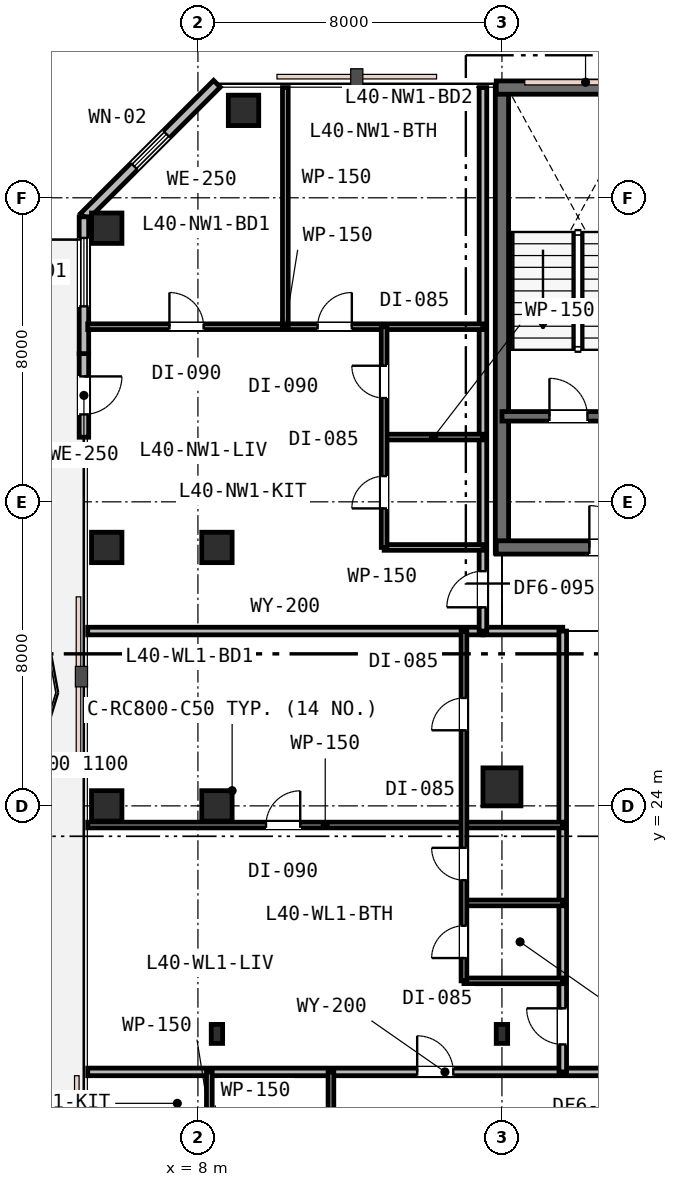
"""IFC4 building model, lengths in metres.
Left out: names, types, materials, properties, quantities, classifications, styles, units other than length and angle.
Written with IfcOpenShell. Run it as: python <this file> out.ifc"""

import sys

from ifc_helpers import new_model, si_unit, direction, frame, frame_2d, origin, origin_2d, place, context, subcontext, project, spatial, rectangle, i_section, extrude, element, fill, save


model = new_model("IFC4")
c1 = context("Model", 3, precision=1e-05, world=origin(), true_north=direction((0.0, 1.0)))
c2 = subcontext(c1, "Body", "Model", "MODEL_VIEW")
j1 = project(units=[si_unit("LENGTHUNIT", "METRE"), si_unit("PLANEANGLEUNIT", "RADIAN")], contexts=[c1])
p1 = place(None, origin())
s1 = spatial("IfcSite", under=j1, at=p1, CompositionType="ELEMENT")
p2 = place(p1, origin())
s2 = spatial("IfcBuilding", under=s1, at=p2, CompositionType="ELEMENT")
p3 = place(p2, frame((0.0, 0.0, 157.8)))
s3 = spatial("IfcBuildingStorey", under=s2, at=p3, CompositionType="ELEMENT", Elevation=157.8)
p4 = place(p3, frame((16.0, 30.65, 0.0), z_axis=(0.0, 0.0, 1.0), x_axis=(0.0, 1.0, 0.0)))
e1 = element("IfcWall", 1, at=p4, inside=s3, PredefinedType="SHEAR", context=c2, shape_type="SweptSolid", body=[
    extrude(rectangle(XDim=12.3, YDim=0.35, at=frame_2d((6.15, 0.0))), origin(), (0.0, 0.0, 1.0), 3.6),
])
p5 = place(p3, frame((15.85, 42.9, 0.0), z_axis=(0.0, 0.0, 1.0), x_axis=(1.0, 0.0, 0.0)))
e2 = element("IfcWall", 2, at=p5, inside=s3, PredefinedType="SHEAR", context=c2, shape_type="SweptSolid", body=[
    extrude(rectangle(XDim=24.3, YDim=0.35, at=frame_2d((12.15, 0.0))), origin(), (0.0, 0.0, 1.0), 3.6),
])
p6 = place(p3, frame((15.85, 30.8, 0.0), z_axis=(0.0, 0.0, 1.0), x_axis=(1.0, 0.0, 0.0)))
e3 = element("IfcWall", 3, at=p6, inside=s3, PredefinedType="SHEAR", context=c2, shape_type="SweptSolid", body=[
    extrude(rectangle(XDim=11.2, YDim=0.35, at=frame_2d((5.6, 0.0))), origin(), (0.0, 0.0, 1.0), 3.6),
])
p7 = place(p6, frame((2.45, 0.0, 0.0)))
e4 = element("IfcOpeningElement", 4, at=p7, cuts=e3, PredefinedType="OPENING", context=c2, shape_type="SweptSolid", body=[
    extrude(rectangle(XDim=1.1, YDim=2.15, at=frame_2d((0.55, 1.075))), frame((0.0, 0.185, 0.0), z_axis=(0.0, -1.0, 0.0), x_axis=(1.0, 0.0, 0.0)), (0.0, 0.0, 1.0), 0.37),
])
p8 = place(p3, frame((16.0, 34.25, 0.0), z_axis=(0.0, 0.0, 1.0), x_axis=(1.0, 0.0, 0.0)))
e5 = element("IfcWall", 5, at=p8, inside=s3, PredefinedType="SHEAR", context=c2, shape_type="SweptSolid", body=[
    extrude(rectangle(XDim=6.05, YDim=0.25, at=frame_2d((3.025, 0.0))), origin(), (0.0, 0.0, 1.0), 3.6),
])
p9 = place(p8, frame((1.25, 0.0, 0.0)))
e6 = element("IfcOpeningElement", 6, at=p9, cuts=e5, PredefinedType="OPENING", context=c2, shape_type="SweptSolid", body=[
    extrude(rectangle(XDim=1.0, YDim=2.15, at=frame_2d((0.5, 1.075))), frame((0.0, 0.135, 0.0), z_axis=(0.0, -1.0, 0.0), x_axis=(1.0, 0.0, 0.0)), (0.0, 0.0, 1.0), 0.27),
])
p10 = place(p8, frame((4.2, 0.0, 0.0)))
e7 = element("IfcOpeningElement", 7, at=p10, cuts=e5, PredefinedType="OPENING", context=c2, shape_type="SweptSolid", body=[
    extrude(rectangle(XDim=1.1, YDim=2.15, at=frame_2d((0.55, 1.075))), frame((0.0, 0.135, 0.0), z_axis=(0.0, -1.0, 0.0), x_axis=(1.0, 0.0, 0.0)), (0.0, 0.0, 1.0), 0.27),
])
p11 = place(p3, frame((8.5, 24.0, 0.0), z_axis=(0.0, 0.0, 1.0), x_axis=(1.0, 0.0, 0.0)))
e8 = element("IfcColumn", 8, at=p11, inside=s3, PredefinedType="COLUMN", context=c2, shape_type="SweptSolid", body=[
    extrude(rectangle(XDim=0.8, YDim=0.8, at=origin_2d()), origin(), (0.0, 0.0, 1.0), 3.6),
])
p12 = place(p3, frame((16.0, 24.5, 0.0), z_axis=(0.0, 0.0, 1.0), x_axis=(1.0, 0.0, 0.0)))
e9 = element("IfcColumn", 9, at=p12, inside=s3, PredefinedType="COLUMN", context=c2, shape_type="SweptSolid", body=[
    extrude(rectangle(XDim=1.0, YDim=1.0, at=origin_2d()), origin(), (0.0, 0.0, 1.0), 3.6),
])
for number, where, z_axis, x_axis in (
    (10, (5.6, 24.0, 0.0), (0.0, 0.0, 1.0), (1.0, 0.0, 0.0)),
    (11, (5.6, 30.8, 0.0), (0.0, 0.0, 1.0), (1.0, 0.0, 0.0)),
    (12, (5.6, 39.2, 0.0), (0.0, 0.0, 1.0), (1.0, 0.0, 0.0)),
    (13, (8.5, 30.8, 0.0), (0.0, 0.0, 1.0), (1.0, 0.0, 0.0)),
    (14, (9.2, 42.3, 0.0), (0.0, 0.0, 1.0), (1.0, 0.0, 0.0)),
):
    element("IfcColumn", number, at=place(p3, frame(where, z_axis=z_axis, x_axis=x_axis)), inside=s3, PredefinedType="COLUMN", context=c2, shape_type="SweptSolid", body=[
        extrude(rectangle(XDim=0.8, YDim=0.8, at=origin_2d()), origin(), (0.0, 0.0, 1.0), 3.6),
    ])
for number, where, z_axis, x_axis in (
    (15, (8.5, 18.0, 0.0), (0.0, 0.0, 1.0), (1.0, 0.0, 0.0)),
    (16, (16.0, 18.0, 0.0), (0.0, 0.0, 1.0), (1.0, 0.0, 0.0)),
):
    element("IfcColumn", number, at=place(p3, frame(where, z_axis=z_axis, x_axis=x_axis)), inside=s3, PredefinedType="COLUMN", context=c2, shape_type="SweptSolid", body=[
        extrude(i_section(OverallWidth=0.3, OverallDepth=0.5, WebThickness=0.015, FlangeThickness=0.028, FilletRadius=0.027, at=origin_2d()), origin(), (0.0, 0.0, 1.0), 3.6),
    ])
p13 = place(p3, frame((8.5, 43.0, 0.0), z_axis=(0.0, 0.0, 1.0), x_axis=(-0.707106781187, -0.707106781187, 0.0)))
e17 = element("IfcWall", 17, at=p13, inside=s3, PredefinedType="STANDARD", context=c2, shape_type="SweptSolid", body=[
    extrude(rectangle(XDim=4.95, YDim=0.25, at=frame_2d((2.475, 0.0))), origin(), (0.0, 0.0, 1.0), 3.33),
])
p14 = place(p13, frame((1.875, 0.0, 0.85)))
e18 = element("IfcOpeningElement", 18, at=p14, cuts=e17, PredefinedType="OPENING", context=c2, shape_type="SweptSolid", body=[
    extrude(rectangle(XDim=1.2, YDim=1.6, at=frame_2d((0.6, 0.8))), frame((0.0, 0.135, 0.0), z_axis=(0.0, -1.0, 0.0), x_axis=(1.0, 0.0, 0.0)), (0.0, 0.0, 1.0), 0.27),
])
p15 = place(p3, frame((5.0, 35.9, 0.0), z_axis=(0.0, 0.0, 1.0), x_axis=(0.0, -1.0, 0.0)))
e19 = element("IfcWall", 19, at=p15, inside=s3, PredefinedType="STANDARD", context=c2, shape_type="SweptSolid", body=[
    extrude(rectangle(XDim=2.2, YDim=0.25, at=frame_2d((1.1, 0.0))), origin(), (0.0, 0.0, 1.0), 3.33),
])
p16 = place(p15, frame((0.6, 0.0, 0.0)))
e20 = element("IfcOpeningElement", 20, at=p16, cuts=e19, PredefinedType="OPENING", context=c2, shape_type="SweptSolid", body=[
    extrude(rectangle(XDim=1.0, YDim=2.15, at=frame_2d((0.5, 1.075))), frame((0.0, 0.135, 0.0), z_axis=(0.0, -1.0, 0.0), x_axis=(1.0, 0.0, 0.0)), (0.0, 0.0, 1.0), 0.27),
])
p17 = place(p3, frame((5.0, 39.5, 0.0), z_axis=(0.0, 0.0, 1.0), x_axis=(0.0, -1.0, 0.0)))
e21 = element("IfcWall", 21, at=p17, inside=s3, PredefinedType="STANDARD", context=c2, shape_type="SweptSolid", body=[
    extrude(rectangle(XDim=3.6, YDim=0.25, at=frame_2d((1.8, 0.0))), origin(), (0.0, 0.0, 1.0), 3.33),
])
p18 = place(p17, frame((0.556, 0.0, 0.75)))
e22 = element("IfcOpeningElement", 22, at=p18, cuts=e21, PredefinedType="OPENING", context=c2, shape_type="SweptSolid", body=[
    extrude(rectangle(XDim=1.8, YDim=1.85, at=frame_2d((0.9, 0.925))), frame((0.0, 0.135, 0.0), z_axis=(0.0, -1.0, 0.0), x_axis=(1.0, 0.0, 0.0)), (0.0, 0.0, 1.0), 0.27),
])
p19 = place(p3, frame((5.1, 28.6, 0.0), z_axis=(0.0, 0.0, 1.0), x_axis=(1.0, 0.0, 0.0)))
e23 = element("IfcWall", 23, at=p19, inside=s3, PredefinedType="PARTITIONING", context=c2, shape_type="SweptSolid", body=[
    extrude(rectangle(XDim=10.4, YDim=0.2, at=frame_2d((5.2, 0.0))), origin(), (0.0, 0.0, 1.0), 2.93),
])
p20 = place(p3, frame((15.5, 28.6, 0.0), z_axis=(0.0, 0.0, 1.0), x_axis=(1.0, 0.0, 0.0)))
e24 = element("IfcWall", 24, at=p20, inside=s3, PredefinedType="PARTITIONING", context=c2, shape_type="SweptSolid", body=[
    extrude(rectangle(XDim=2.1, YDim=0.2, at=frame_2d((1.05, 0.0))), origin(), (0.0, 0.0, 1.0), 2.93),
])
p21 = place(p3, frame((15.5, 28.6, 0.0), z_axis=(0.0, 0.0, 1.0), x_axis=(0.0, 1.0, 0.0)))
e25 = element("IfcWall", 25, at=p21, inside=s3, PredefinedType="PARTITIONING", context=c2, shape_type="SweptSolid", body=[
    extrude(rectangle(XDim=14.3, YDim=0.2, at=frame_2d((7.15, 0.0))), origin(), (0.0, 0.0, 1.0), 2.93),
])
p22 = place(p21, frame((0.625, 0.0, 0.0)))
e26 = element("IfcOpeningElement", 26, at=p22, cuts=e25, PredefinedType="OPENING", context=c2, shape_type="SweptSolid", body=[
    extrude(rectangle(XDim=0.95, YDim=2.15, at=frame_2d((0.475, 1.075))), frame((0.0, 0.11, 0.0), z_axis=(0.0, -1.0, 0.0), x_axis=(1.0, 0.0, 0.0)), (0.0, 0.0, 1.0), 0.22),
])
p23 = place(p3, frame((12.9, 30.8, 0.0), z_axis=(0.0, 0.0, 1.0), x_axis=(1.0, 0.0, 0.0)))
e27 = element("IfcWall", 27, at=p23, inside=s3, PredefinedType="PARTITIONING", context=c2, shape_type="SweptSolid", body=[
    extrude(rectangle(XDim=2.6, YDim=0.15, at=frame_2d((1.3, 0.0))), origin(), (0.0, 0.0, 1.0), 2.93),
])
p24 = place(p3, frame((12.9, 33.704, 0.0), z_axis=(0.0, 0.0, 1.0), x_axis=(1.0, 0.0, 0.0)))
e28 = element("IfcWall", 28, at=p24, inside=s3, PredefinedType="PARTITIONING", context=c2, shape_type="SweptSolid", body=[
    extrude(rectangle(XDim=2.6, YDim=0.15, at=frame_2d((1.3, 0.0))), origin(), (0.0, 0.0, 1.0), 3.33),
])
p25 = place(p3, frame((5.1, 36.608, 0.0), z_axis=(0.0, 0.0, 1.0), x_axis=(1.0, 0.0, 0.0)))
e29 = element("IfcWall", 29, at=p25, inside=s3, PredefinedType="PARTITIONING", context=c2, shape_type="SweptSolid", body=[
    extrude(rectangle(XDim=10.4, YDim=0.15, at=frame_2d((5.2, 0.0))), origin(), (0.0, 0.0, 1.0), 3.01),
])
p26 = place(p25, frame((2.15, 0.0, 0.0)))
e30 = element("IfcOpeningElement", 30, at=p26, cuts=e29, PredefinedType="OPENING", context=c2, shape_type="SweptSolid", body=[
    extrude(rectangle(XDim=0.9, YDim=2.15, at=frame_2d((0.45, 1.075))), frame((0.0, 0.085, 0.0), z_axis=(0.0, -1.0, 0.0), x_axis=(1.0, 0.0, 0.0)), (0.0, 0.0, 1.0), 0.17),
])
p27 = place(p25, frame((6.05, 0.0, 0.0)))
e31 = element("IfcOpeningElement", 31, at=p27, cuts=e29, PredefinedType="OPENING", context=c2, shape_type="SweptSolid", body=[
    extrude(rectangle(XDim=0.9, YDim=2.15, at=frame_2d((0.45, 1.075))), frame((0.0, 0.085, 0.0), z_axis=(0.0, -1.0, 0.0), x_axis=(1.0, 0.0, 0.0)), (0.0, 0.0, 1.0), 0.17),
])
p28 = place(p3, frame((12.9, 30.8, 0.0), z_axis=(0.0, 0.0, 1.0), x_axis=(0.0, 1.0, 0.0)))
e32 = element("IfcWall", 32, at=p28, inside=s3, PredefinedType="PARTITIONING", context=c2, shape_type="SweptSolid", body=[
    extrude(rectangle(XDim=5.808, YDim=0.15, at=frame_2d((2.904, 0.0))), origin(), (0.0, 0.0, 1.0), 2.93),
])
p29 = place(p28, frame((1.027, 0.0, 0.0)))
e33 = element("IfcOpeningElement", 33, at=p29, cuts=e32, PredefinedType="OPENING", context=c2, shape_type="SweptSolid", body=[
    extrude(rectangle(XDim=0.85, YDim=2.15, at=frame_2d((0.425, 1.075))), frame((0.0, 0.085, 0.0), z_axis=(0.0, -1.0, 0.0), x_axis=(1.0, 0.0, 0.0)), (0.0, 0.0, 1.0), 0.17),
])
p30 = place(p28, frame((3.931, 0.0, 0.0)))
e34 = element("IfcOpeningElement", 34, at=p30, cuts=e32, PredefinedType="OPENING", context=c2, shape_type="SweptSolid", body=[
    extrude(rectangle(XDim=0.85, YDim=2.15, at=frame_2d((0.425, 1.075))), frame((0.0, 0.085, 0.0), z_axis=(0.0, -1.0, 0.0), x_axis=(1.0, 0.0, 0.0)), (0.0, 0.0, 1.0), 0.17),
])
p31 = place(p3, frame((10.3, 36.608, 0.0), z_axis=(0.0, 0.0, 1.0), x_axis=(0.0, 1.0, 0.0)))
e35 = element("IfcWall", 35, at=p31, inside=s3, PredefinedType="PARTITIONING", context=c2, shape_type="SweptSolid", body=[
    extrude(rectangle(XDim=6.292, YDim=0.15, at=frame_2d((3.146, 0.0))), origin(), (0.0, 0.0, 1.0), 3.33),
])
p32 = place(p3, frame((5.1, 17.0, 0.0), z_axis=(0.0, 0.0, 1.0), x_axis=(1.0, 0.0, 0.0)))
e36 = element("IfcWall", 36, at=p32, inside=s3, PredefinedType="PARTITIONING", context=c2, shape_type="SweptSolid", body=[
    extrude(rectangle(XDim=18.8, YDim=0.2, at=frame_2d((9.4, 0.0))), origin(), (0.0, 0.0, 1.0), 2.93),
])
p33 = place(p32, frame((8.669, 0.0, 0.0)))
e37 = element("IfcOpeningElement", 37, at=p33, cuts=e36, PredefinedType="OPENING", context=c2, shape_type="SweptSolid", body=[
    extrude(rectangle(XDim=0.95, YDim=2.15, at=frame_2d((0.475, 1.075))), frame((0.0, 0.11, 0.0), z_axis=(0.0, -1.0, 0.0), x_axis=(1.0, 0.0, 0.0)), (0.0, 0.0, 1.0), 0.22),
])
p34 = place(p3, frame((17.6, 17.0, 0.0), z_axis=(0.0, 0.0, 1.0), x_axis=(0.0, 1.0, 0.0)))
e38 = element("IfcWall", 38, at=p34, inside=s3, PredefinedType="PARTITIONING", context=c2, shape_type="SweptSolid", body=[
    extrude(rectangle(XDim=11.6, YDim=0.2, at=frame_2d((5.8, 0.0))), origin(), (0.0, 0.0, 1.0), 2.93),
])
p35 = place(p34, frame((0.723, 0.0, 0.0)))
e39 = element("IfcOpeningElement", 39, at=p35, cuts=e38, PredefinedType="OPENING", context=c2, shape_type="SweptSolid", body=[
    extrude(rectangle(XDim=0.95, YDim=2.15, at=frame_2d((0.475, 1.075))), frame((0.0, 0.11, 0.0), z_axis=(0.0, -1.0, 0.0), x_axis=(1.0, 0.0, 0.0)), (0.0, 0.0, 1.0), 0.22),
])
for number, where, z_axis, x_axis in (
    (40, (15.0, 19.396, 0.0), (0.0, 0.0, 1.0), (1.0, 0.0, 0.0)),
    (41, (15.0, 21.446, 0.0), (0.0, 0.0, 1.0), (1.0, 0.0, 0.0)),
):
    element("IfcWall", number, at=place(p3, frame(where, z_axis=z_axis, x_axis=x_axis)), inside=s3, PredefinedType="PARTITIONING", context=c2, shape_type="SweptSolid", body=[
        extrude(rectangle(XDim=2.6, YDim=0.15, at=frame_2d((1.3, 0.0))), origin(), (0.0, 0.0, 1.0), 2.93),
    ])
p36 = place(p3, frame((5.1, 23.496, 0.0), z_axis=(0.0, 0.0, 1.0), x_axis=(1.0, 0.0, 0.0)))
e42 = element("IfcWall", 42, at=p36, inside=s3, PredefinedType="PARTITIONING", context=c2, shape_type="SweptSolid", body=[
    extrude(rectangle(XDim=12.5, YDim=0.15, at=frame_2d((6.25, 0.0))), origin(), (0.0, 0.0, 1.0), 2.93),
])
p37 = place(p36, frame((4.692, 0.0, 0.0)))
e43 = element("IfcOpeningElement", 43, at=p37, cuts=e42, PredefinedType="OPENING", context=c2, shape_type="SweptSolid", body=[
    extrude(rectangle(XDim=0.9, YDim=2.15, at=frame_2d((0.45, 1.075))), frame((0.0, 0.085, 0.0), z_axis=(0.0, -1.0, 0.0), x_axis=(1.0, 0.0, 0.0)), (0.0, 0.0, 1.0), 0.17),
])
p38 = place(p3, frame((15.0, 19.396, 0.0), z_axis=(0.0, 0.0, 1.0), x_axis=(0.0, 1.0, 0.0)))
e44 = element("IfcWall", 44, at=p38, inside=s3, PredefinedType="PARTITIONING", context=c2, shape_type="SweptSolid", body=[
    extrude(rectangle(XDim=9.204, YDim=0.15, at=frame_2d((4.602, 0.0))), origin(), (0.0, 0.0, 1.0), 2.93),
])
p39 = place(p38, frame((0.6, 0.0, 0.0)))
e45 = element("IfcOpeningElement", 45, at=p39, cuts=e44, PredefinedType="OPENING", context=c2, shape_type="SweptSolid", body=[
    extrude(rectangle(XDim=0.85, YDim=2.15, at=frame_2d((0.425, 1.075))), frame((0.0, 0.085, 0.0), z_axis=(0.0, -1.0, 0.0), x_axis=(1.0, 0.0, 0.0)), (0.0, 0.0, 1.0), 0.17),
])
p40 = place(p38, frame((2.65, 0.0, 0.0)))
e46 = element("IfcOpeningElement", 46, at=p40, cuts=e44, PredefinedType="OPENING", context=c2, shape_type="SweptSolid", body=[
    extrude(rectangle(XDim=0.85, YDim=2.15, at=frame_2d((0.425, 1.075))), frame((0.0, 0.085, 0.0), z_axis=(0.0, -1.0, 0.0), x_axis=(1.0, 0.0, 0.0)), (0.0, 0.0, 1.0), 0.17),
])
p41 = place(p38, frame((6.593, 0.0, 0.0)))
e47 = element("IfcOpeningElement", 47, at=p41, cuts=e44, PredefinedType="OPENING", context=c2, shape_type="SweptSolid", body=[
    extrude(rectangle(XDim=0.85, YDim=2.15, at=frame_2d((0.425, 1.075))), frame((0.0, 0.085, 0.0), z_axis=(0.0, -1.0, 0.0), x_axis=(1.0, 0.0, 0.0)), (0.0, 0.0, 1.0), 0.17),
])
p42 = place(p3, frame((11.5, 14.65, 0.0), z_axis=(0.0, 0.0, 1.0), x_axis=(0.0, 1.0, 0.0)))
e48 = element("IfcWall", 48, at=p42, inside=s3, PredefinedType="PARTITIONING", context=c2, shape_type="SweptSolid", body=[
    extrude(rectangle(XDim=2.35, YDim=0.15, at=frame_2d((1.175, 0.0))), origin(), (0.0, 0.0, 1.0), 2.96),
])
p43 = place(p3, frame((8.3, 14.65, 0.0), z_axis=(0.0, 0.0, 1.0), x_axis=(0.0, 1.0, 0.0)))
e49 = element("IfcWall", 49, at=p43, inside=s3, PredefinedType="PARTITIONING", context=c2, shape_type="SweptSolid", body=[
    extrude(rectangle(XDim=2.35, YDim=0.15, at=frame_2d((1.175, 0.0))), origin(), (0.0, 0.0, 1.0), 2.93),
])
p44 = place(p14, origin())
e50 = element("IfcWindow", 50, at=p44, inside=s3, PartitioningType="SINGLE_PANEL", PredefinedType="WINDOW", context=c2, shape_type="SweptSolid", body=[
    extrude(rectangle(XDim=1.2, YDim=1.6, at=frame_2d((0.6, 0.8))), frame((0.0, 0.03, 0.0), z_axis=(0.0, -1.0, 0.0), x_axis=(1.0, 0.0, 0.0)), (0.0, 0.0, 1.0), 0.06),
])
fill(e18, e50)
p45 = place(p16, origin())
e51 = element("IfcDoor", 51, at=p45, inside=s3, OperationType="SINGLE_SWING_LEFT", PredefinedType="DOOR", context=c2, shape_type="SweptSolid", body=[
    extrude(rectangle(XDim=1.0, YDim=2.15, at=frame_2d((0.5, 1.075))), frame((0.0, 0.025, 0.0), z_axis=(0.0, -1.0, 0.0), x_axis=(1.0, 0.0, 0.0)), (0.0, 0.0, 1.0), 0.05),
])
fill(e20, e51)
p46 = place(p18, origin())
e52 = element("IfcWindow", 52, at=p46, inside=s3, PartitioningType="SINGLE_PANEL", PredefinedType="WINDOW", context=c2, shape_type="SweptSolid", body=[
    extrude(rectangle(XDim=1.8, YDim=1.85, at=frame_2d((0.9, 0.925))), frame((0.0, 0.03, 0.0), z_axis=(0.0, -1.0, 0.0), x_axis=(1.0, 0.0, 0.0)), (0.0, 0.0, 1.0), 0.06),
])
fill(e22, e52)
p47 = place(p9, origin())
e53 = element("IfcDoor", 53, at=p47, inside=s3, OperationType="SINGLE_SWING_LEFT", PredefinedType="DOOR", context=c2, shape_type="SweptSolid", body=[
    extrude(rectangle(XDim=1.0, YDim=2.15, at=frame_2d((0.5, 1.075))), frame((0.0, 0.025, 0.0), z_axis=(0.0, -1.0, 0.0), x_axis=(1.0, 0.0, 0.0)), (0.0, 0.0, 1.0), 0.05),
])
fill(e6, e53)
p48 = place(p7, origin())
e54 = element("IfcDoor", 54, at=p48, inside=s3, OperationType="SINGLE_SWING_LEFT", PredefinedType="DOOR", context=c2, shape_type="SweptSolid", body=[
    extrude(rectangle(XDim=1.1, YDim=2.15, at=frame_2d((0.55, 1.075))), frame((0.0, 0.025, 0.0), z_axis=(0.0, -1.0, 0.0), x_axis=(1.0, 0.0, 0.0)), (0.0, 0.0, 1.0), 0.05),
])
fill(e4, e54)
p49 = place(p22, origin())
e55 = element("IfcDoor", 55, at=p49, inside=s3, OperationType="SINGLE_SWING_LEFT", PredefinedType="DOOR", context=c2, shape_type="SweptSolid", body=[
    extrude(rectangle(XDim=0.95, YDim=2.15, at=frame_2d((0.475, 1.075))), frame((0.0, 0.025, 0.0), z_axis=(0.0, -1.0, 0.0), x_axis=(1.0, 0.0, 0.0)), (0.0, 0.0, 1.0), 0.05),
])
fill(e26, e55)
p50 = place(p29, origin())
e56 = element("IfcDoor", 56, at=p50, inside=s3, OperationType="SINGLE_SWING_LEFT", PredefinedType="DOOR", context=c2, shape_type="SweptSolid", body=[
    extrude(rectangle(XDim=0.85, YDim=2.15, at=frame_2d((0.425, 1.075))), frame((0.0, 0.025, 0.0), z_axis=(0.0, -1.0, 0.0), x_axis=(1.0, 0.0, 0.0)), (0.0, 0.0, 1.0), 0.05),
])
fill(e33, e56)
p51 = place(p30, origin())
e57 = element("IfcDoor", 57, at=p51, inside=s3, OperationType="SINGLE_SWING_RIGHT", PredefinedType="DOOR", context=c2, shape_type="SweptSolid", body=[
    extrude(rectangle(XDim=0.85, YDim=2.15, at=frame_2d((0.425, 1.075))), frame((0.0, 0.025, 0.0), z_axis=(0.0, -1.0, 0.0), x_axis=(1.0, 0.0, 0.0)), (0.0, 0.0, 1.0), 0.05),
])
fill(e34, e57)
p52 = place(p26, origin())
e58 = element("IfcDoor", 58, at=p52, inside=s3, OperationType="SINGLE_SWING_LEFT", PredefinedType="DOOR", context=c2, shape_type="SweptSolid", body=[
    extrude(rectangle(XDim=0.9, YDim=2.15, at=frame_2d((0.45, 1.075))), frame((0.0, 0.025, 0.0), z_axis=(0.0, -1.0, 0.0), x_axis=(1.0, 0.0, 0.0)), (0.0, 0.0, 1.0), 0.05),
])
fill(e30, e58)
p53 = place(p27, origin())
e59 = element("IfcDoor", 59, at=p53, inside=s3, OperationType="SINGLE_SWING_RIGHT", PredefinedType="DOOR", context=c2, shape_type="SweptSolid", body=[
    extrude(rectangle(XDim=0.9, YDim=2.15, at=frame_2d((0.45, 1.075))), frame((0.0, 0.025, 0.0), z_axis=(0.0, -1.0, 0.0), x_axis=(1.0, 0.0, 0.0)), (0.0, 0.0, 1.0), 0.05),
])
fill(e31, e59)
p54 = place(p35, origin())
e60 = element("IfcDoor", 60, at=p54, inside=s3, OperationType="SINGLE_SWING_RIGHT", PredefinedType="DOOR", context=c2, shape_type="SweptSolid", body=[
    extrude(rectangle(XDim=0.95, YDim=2.15, at=frame_2d((0.475, 1.075))), frame((0.0, 0.025, 0.0), z_axis=(0.0, -1.0, 0.0), x_axis=(1.0, 0.0, 0.0)), (0.0, 0.0, 1.0), 0.05),
])
fill(e39, e60)
p55 = place(p39, origin())
e61 = element("IfcDoor", 61, at=p55, inside=s3, OperationType="SINGLE_SWING_LEFT", PredefinedType="DOOR", context=c2, shape_type="SweptSolid", body=[
    extrude(rectangle(XDim=0.85, YDim=2.15, at=frame_2d((0.425, 1.075))), frame((0.0, 0.025, 0.0), z_axis=(0.0, -1.0, 0.0), x_axis=(1.0, 0.0, 0.0)), (0.0, 0.0, 1.0), 0.05),
])
fill(e45, e61)
p56 = place(p40, origin())
e62 = element("IfcDoor", 62, at=p56, inside=s3, OperationType="SINGLE_SWING_RIGHT", PredefinedType="DOOR", context=c2, shape_type="SweptSolid", body=[
    extrude(rectangle(XDim=0.85, YDim=2.15, at=frame_2d((0.425, 1.075))), frame((0.0, 0.025, 0.0), z_axis=(0.0, -1.0, 0.0), x_axis=(1.0, 0.0, 0.0)), (0.0, 0.0, 1.0), 0.05),
])
fill(e46, e62)
p57 = place(p41, origin())
e63 = element("IfcDoor", 63, at=p57, inside=s3, OperationType="SINGLE_SWING_LEFT", PredefinedType="DOOR", context=c2, shape_type="SweptSolid", body=[
    extrude(rectangle(XDim=0.85, YDim=2.15, at=frame_2d((0.425, 1.075))), frame((0.0, 0.025, 0.0), z_axis=(0.0, -1.0, 0.0), x_axis=(1.0, 0.0, 0.0)), (0.0, 0.0, 1.0), 0.05),
])
fill(e47, e63)
p58 = place(p37, origin())
e64 = element("IfcDoor", 64, at=p58, inside=s3, OperationType="SINGLE_SWING_RIGHT", PredefinedType="DOOR", context=c2, shape_type="SweptSolid", body=[
    extrude(rectangle(XDim=0.9, YDim=2.15, at=frame_2d((0.45, 1.075))), frame((0.0, 0.025, 0.0), z_axis=(0.0, -1.0, 0.0), x_axis=(1.0, 0.0, 0.0)), (0.0, 0.0, 1.0), 0.05),
])
fill(e43, e64)
p59 = place(p33, origin())
e65 = element("IfcDoor", 65, at=p59, inside=s3, OperationType="SINGLE_SWING_LEFT", PredefinedType="DOOR", context=c2, shape_type="SweptSolid", body=[
    extrude(rectangle(XDim=0.95, YDim=2.15, at=frame_2d((0.475, 1.075))), frame((0.0, 0.025, 0.0), z_axis=(0.0, -1.0, 0.0), x_axis=(1.0, 0.0, 0.0)), (0.0, 0.0, 1.0), 0.05),
])
fill(e37, e65)
save(model, sys.argv[1])
